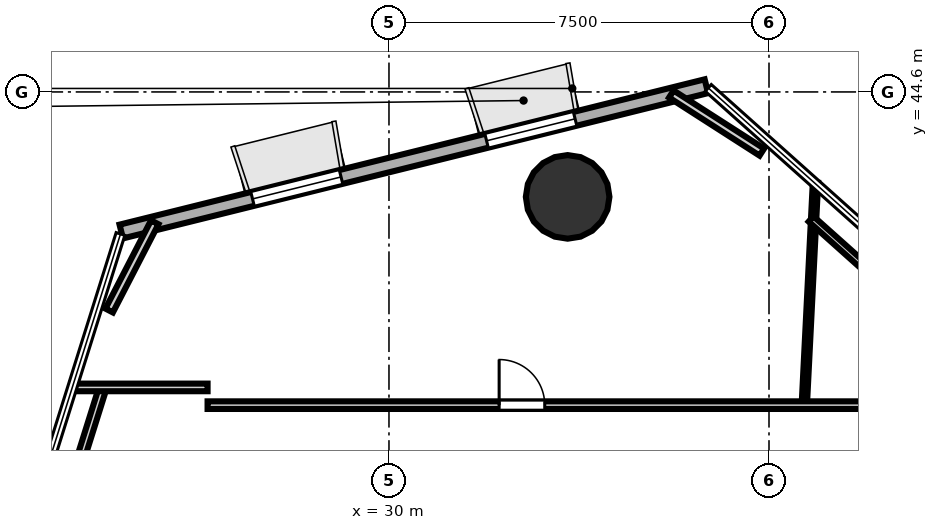
"""IFC4 building model, lengths in metres.
Left out: names, types, materials, properties, quantities, classifications, styles, units other than length and angle.
Written with IfcOpenShell. Run it as: python <this file> out.ifc"""

import sys

from ifc_helpers import new_model, si_unit, direction, frame, frame_2d, origin, origin_2d, place, context, subcontext, project, spatial, rectangle, hollow_circle, extrude, element, fill, save


model = new_model("IFC4")
c1 = context("Model", 3, precision=1e-05, world=origin(), true_north=direction((0.0, 1.0)))
c2 = subcontext(c1, "Body", "Model", "MODEL_VIEW")
j1 = project(units=[si_unit("LENGTHUNIT", "METRE"), si_unit("PLANEANGLEUNIT", "RADIAN")], contexts=[c1])
p1 = place(None, origin())
s1 = spatial("IfcSite", under=j1, at=p1, CompositionType="ELEMENT")
p2 = place(p1, origin())
s2 = spatial("IfcBuilding", under=s1, at=p2, CompositionType="ELEMENT")
p3 = place(p2, frame((0.0, 0.0, 71.0)))
s3 = spatial("IfcBuildingStorey", under=s2, at=p3, CompositionType="ELEMENT", Elevation=71.0)
p4 = place(p3, frame((33.526, 42.529, 0.0), z_axis=(0.0, 0.0, 1.0), x_axis=(1.0, 0.0, 0.0)))
e1 = element("IfcColumn", 1, at=p4, inside=s3, PredefinedType="COLUMN", context=c2, shape_type="SweptSolid", body=[
    extrude(hollow_circle(Radius=0.825, WallThickness=0.04, at=origin_2d()), origin(), (0.0, 0.0, 1.0), 3.7),
])
p5 = place(p3, frame((36.264, 44.713, 0.0), z_axis=(0.0, 0.0, 1.0), x_axis=(-0.97052151051, -0.241014517483, 0.0)))
e2 = element("IfcWall", 2, at=p5, inside=s3, PredefinedType="SOLIDWALL", context=c2, shape_type="SweptSolid", body=[
    extrude(rectangle(XDim=11.898, YDim=0.28, at=frame_2d((5.949, 0.0))), origin(), (0.0, 0.0, 1.0), 3.52),
])
p6 = place(p5, frame((2.669, 0.0, 0.85)))
e3 = element("IfcOpeningElement", 3, at=p6, cuts=e2, PredefinedType="OPENING", context=c2, shape_type="SweptSolid", body=[
    extrude(rectangle(XDim=1.8, YDim=2.1, at=frame_2d((0.9, 1.05))), frame((0.0, 0.15, 0.0), z_axis=(0.0, -1.0, 0.0), x_axis=(1.0, 0.0, 0.0)), (0.0, 0.0, 1.0), 0.3),
])
p7 = place(p5, frame((7.429, 0.0, 0.85)))
e4 = element("IfcOpeningElement", 4, at=p7, cuts=e2, PredefinedType="OPENING", context=c2, shape_type="SweptSolid", body=[
    extrude(rectangle(XDim=1.8, YDim=2.1, at=frame_2d((0.9, 1.05))), frame((0.0, 0.15, 0.0), z_axis=(0.0, -1.0, 0.0), x_axis=(1.0, 0.0, 0.0)), (0.0, 0.0, 1.0), 0.3),
])
p8 = place(p3, frame((23.58, 36.305, 0.0), z_axis=(0.0, 0.0, 1.0), x_axis=(0.299709657819, 0.954030461259, 0.0)))
e5 = element("IfcWall", 5, at=p8, inside=s3, PredefinedType="PARTITIONING", context=c2, shape_type="SweptSolid", body=[
    extrude(rectangle(XDim=2.606, YDim=0.15, at=frame_2d((1.303, 0.0))), origin(), (0.0, 0.0, 1.0), 2.84),
])
p9 = place(p3, frame((23.73, 38.769, 0.0), z_axis=(0.0, 0.0, 1.0), x_axis=(1.0, 0.0, 0.0)))
e6 = element("IfcWall", 6, at=p9, inside=s3, PredefinedType="PARTITIONING", context=c2, shape_type="SweptSolid", body=[
    extrude(rectangle(XDim=2.69, YDim=0.15, at=frame_2d((1.345, 0.0))), origin(), (0.0, 0.0, 1.0), 2.84),
])
p10 = place(p3, frame((26.42, 38.419, 0.0), z_axis=(0.0, 0.0, 1.0), x_axis=(1.0, 0.0, 0.0)))
e7 = element("IfcWall", 7, at=p10, inside=s3, PredefinedType="PARTITIONING", context=c2, shape_type="SweptSolid", body=[
    extrude(rectangle(XDim=16.905, YDim=0.15, at=frame_2d((8.453, 0.0))), origin(), (0.0, 0.0, 1.0), 2.798),
])
p11 = place(p10, frame((5.754, 0.0, 0.0)))
e8 = element("IfcOpeningElement", 8, at=p11, cuts=e7, PredefinedType="OPENING", context=c2, shape_type="SweptSolid", body=[
    extrude(rectangle(XDim=0.9, YDim=2.1, at=frame_2d((0.45, 1.05))), frame((0.0, 0.085, 0.0), z_axis=(0.0, -1.0, 0.0), x_axis=(1.0, 0.0, 0.0)), (0.0, 0.0, 1.0), 0.17),
])
p12 = place(p3, frame((38.202, 38.528, 0.0), z_axis=(0.0, 0.0, 1.0), x_axis=(0.050179078892, 0.998740236519, 0.0)))
e9 = element("IfcWall", 9, at=p12, inside=s3, PredefinedType="PARTITIONING", context=c2, shape_type="SweptSolid", body=[
    extrude(rectangle(XDim=4.286, YDim=0.105, at=frame_2d((2.143, 0.0))), origin(), (0.0, 0.0, 1.0), 2.798),
])
p13 = place(p3, frame((38.33, 42.093, 0.0), z_axis=(0.0, 0.0, 1.0), x_axis=(0.745568655549, -0.666428825804, 0.0)))
e10 = element("IfcWall", 10, at=p13, inside=s3, PredefinedType="PARTITIONING", context=c2, shape_type="SweptSolid", body=[
    extrude(rectangle(XDim=8.678, YDim=0.14, at=frame_2d((4.339, 0.0))), origin(), (0.0, 0.0, 1.0), 2.84),
])
p14 = place(p3, frame((24.478, 40.286, 0.0), z_axis=(0.0, 0.0, 1.0), x_axis=(0.458788915336, 0.888545289316, 0.0)))
e11 = element("IfcWall", 11, at=p14, inside=s3, PredefinedType="PLUMBINGWALL", context=c2, shape_type="SweptSolid", body=[
    extrude(rectangle(XDim=1.959, YDim=0.165, at=frame_2d((0.979, 0.0))), origin(), (0.0, 0.0, 1.0), 2.84),
])
p15 = place(p3, frame((35.573, 44.558, 0.0), z_axis=(0.0, 0.0, 1.0), x_axis=(0.841727629047, -0.539902397196, 0.0)))
e12 = element("IfcWall", 12, at=p15, inside=s3, PredefinedType="PLUMBINGWALL", context=c2, shape_type="SweptSolid", body=[
    extrude(rectangle(XDim=2.122, YDim=0.165, at=frame_2d((1.061, 0.0))), origin(), (0.0, 0.0, 1.0), 2.84),
])
p16 = place(p11, origin())
e13 = element("IfcDoor", 13, at=p16, inside=s3, OperationType="SINGLE_SWING_LEFT", PredefinedType="DOOR", context=c2, shape_type="SweptSolid", body=[
    extrude(rectangle(XDim=0.9, YDim=2.1, at=frame_2d((0.45, 1.05))), frame((0.0, 0.025, 0.0), z_axis=(0.0, -1.0, 0.0), x_axis=(1.0, 0.0, 0.0)), (0.0, 0.0, 1.0), 0.05),
])
fill(e8, e13)
p17 = place(p6, origin())
e14 = element("IfcWindow", 14, at=p17, inside=s3, PartitioningType="SINGLE_PANEL", PredefinedType="WINDOW", context=c2, shape_type="SweptSolid", body=[
    extrude(rectangle(XDim=1.8, YDim=2.1, at=frame_2d((0.9, 1.05))), frame((0.0, 0.03, 0.0), z_axis=(0.0, -1.0, 0.0), x_axis=(1.0, 0.0, 0.0)), (0.0, 0.0, 1.0), 0.06),
])
fill(e3, e14)
p18 = place(p7, origin())
e15 = element("IfcWindow", 15, at=p18, inside=s3, PartitioningType="SINGLE_PANEL", PredefinedType="WINDOW", context=c2, shape_type="SweptSolid", body=[
    extrude(rectangle(XDim=1.8, YDim=2.1, at=frame_2d((0.9, 1.05))), frame((0.0, 0.03, 0.0), z_axis=(0.0, -1.0, 0.0), x_axis=(1.0, 0.0, 0.0)), (0.0, 0.0, 1.0), 0.06),
])
fill(e4, e15)
save(model, sys.argv[1])
